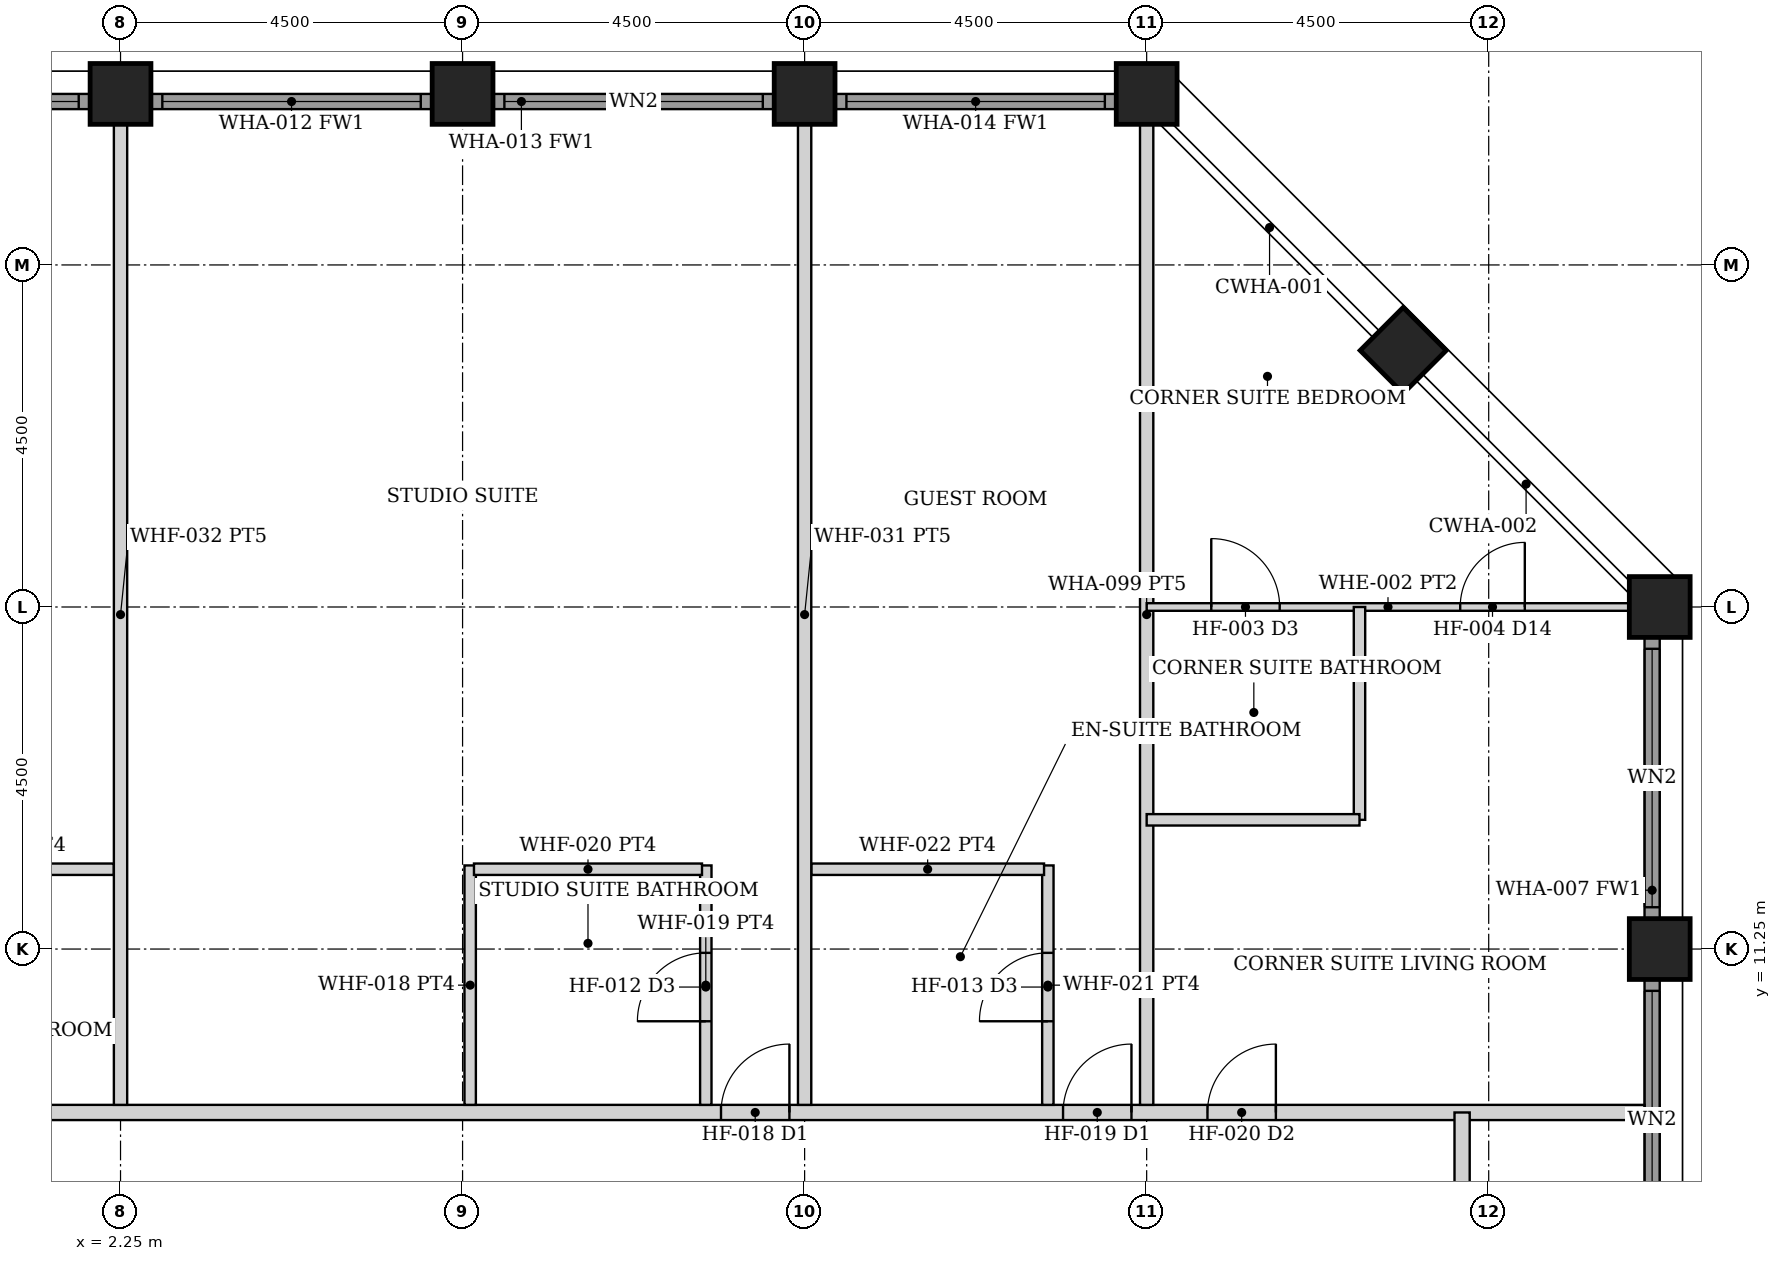
"""IFC4 building model, lengths in metres.
Left out: names, types, materials, properties, quantities, classifications, styles, units other than length and angle.
Written with IfcOpenShell. Run it as: python <this file> out.ifc"""

import sys

from ifc_helpers import new_model, si_unit, direction, frame, frame_2d, origin, origin_2d, place, context, subcontext, project, spatial, rectangle, hollow_rectangle, extrude, element, fill, save


model = new_model("IFC4")
c1 = context("Model", 3, precision=1e-05, world=origin(), true_north=direction((0.0, 1.0)))
c2 = subcontext(c1, "Body", "Model", "MODEL_VIEW")
j1 = project(units=[si_unit("LENGTHUNIT", "METRE"), si_unit("PLANEANGLEUNIT", "RADIAN")], contexts=[c1])
p1 = place(None, origin())
s1 = spatial("IfcSite", under=j1, at=p1, CompositionType="ELEMENT")
p2 = place(p1, origin())
s2 = spatial("IfcBuilding", under=s1, at=p2, CompositionType="ELEMENT")
p3 = place(p2, frame((0.0, 0.0, 172.4)))
s3 = spatial("IfcBuildingStorey", under=s2, at=p3, CompositionType="ELEMENT", Elevation=172.4)
for number, where, z_axis, x_axis in (
    (1, (2.25, 22.5, 0.0), (0.0, 0.0, 1.0), (0.0, 1.0, 0.0)),
    (2, (6.75, 22.5, 0.0), (0.0, 0.0, 1.0), (0.0, 1.0, 0.0)),
    (3, (11.25, 22.5, 0.0), (0.0, 0.0, 1.0), (0.0, 1.0, 0.0)),
    (4, (22.5, 11.25, 0.0), (0.0, 0.0, 1.0), (1.0, 0.0, 0.0)),
    (5, (15.75, 22.5, 0.0), (0.0, 0.0, 1.0), (0.0, 1.0, 0.0)),
    (6, (22.5, 15.75, 0.0), (0.0, 0.0, 1.0), (1.0, 0.0, 0.0)),
    (7, (19.125, 19.125, 0.0), (0.0, 0.0, 1.0), (0.707, 0.707, 0.0)),
):
    element("IfcColumn", number, at=place(p3, frame(where, z_axis=z_axis, x_axis=x_axis)), inside=s3, PredefinedType="COLUMN", context=c2, shape_type="SweptSolid", body=[
        extrude(hollow_rectangle(XDim=0.8, YDim=0.8, WallThickness=0.045, at=origin_2d()), origin(), (0.0, 0.0, 1.0), 3.6),
    ])
p4 = place(p3, frame((22.4, 7.155, 0.0), z_axis=(0.0, 0.0, 1.0), x_axis=(0.0, 1.0, 0.0)))
e8 = element("IfcWall", 8, at=p4, inside=s3, PredefinedType="SOLIDWALL", context=c2, shape_type="SweptSolid", body=[
    extrude(rectangle(XDim=3.69, YDim=0.2, at=frame_2d((1.845, 0.0))), origin(), (0.0, 0.0, 1.0), 2.479),
])
p5 = place(p4, frame((0.145, 0.0, 0.3)))
e9 = element("IfcOpeningElement", 9, at=p5, cuts=e8, PredefinedType="OPENING", context=c2, shape_type="SweptSolid", body=[
    extrude(rectangle(XDim=3.4, YDim=2.029, at=frame_2d((1.7, 1.015))), frame((0.0, 0.11, 0.0), z_axis=(0.0, -1.0, 0.0), x_axis=(1.0, 0.0, 0.0)), (0.0, 0.0, 1.0), 0.22),
])
p6 = place(p3, frame((22.4, 11.655, 0.0), z_axis=(0.0, 0.0, 1.0), x_axis=(0.0, 1.0, 0.0)))
e10 = element("IfcWall", 10, at=p6, inside=s3, PredefinedType="SOLIDWALL", context=c2, shape_type="SweptSolid", body=[
    extrude(rectangle(XDim=3.69, YDim=0.2, at=frame_2d((1.845, 0.0))), origin(), (0.0, 0.0, 1.0), 2.479),
])
p7 = place(p6, frame((0.145, 0.0, 0.3)))
e11 = element("IfcOpeningElement", 11, at=p7, cuts=e10, PredefinedType="OPENING", context=c2, shape_type="SweptSolid", body=[
    extrude(rectangle(XDim=3.4, YDim=2.029, at=frame_2d((1.7, 1.015))), frame((0.0, 0.11, 0.0), z_axis=(0.0, -1.0, 0.0), x_axis=(1.0, 0.0, 0.0)), (0.0, 0.0, 1.0), 0.22),
])
p8 = place(p3, frame((-1.845, 22.4, 0.0), z_axis=(0.0, 0.0, 1.0), x_axis=(1.0, 0.0, 0.0)))
e12 = element("IfcWall", 12, at=p8, inside=s3, PredefinedType="SOLIDWALL", context=c2, shape_type="SweptSolid", body=[
    extrude(rectangle(XDim=3.69, YDim=0.2, at=frame_2d((1.845, 0.0))), origin(), (0.0, 0.0, 1.0), 2.479),
])
p9 = place(p8, frame((0.145, 0.0, 0.3)))
e13 = element("IfcOpeningElement", 13, at=p9, cuts=e12, PredefinedType="OPENING", context=c2, shape_type="SweptSolid", body=[
    extrude(rectangle(XDim=3.4, YDim=2.029, at=frame_2d((1.7, 1.015))), frame((0.0, 0.11, 0.0), z_axis=(0.0, -1.0, 0.0), x_axis=(1.0, 0.0, 0.0)), (0.0, 0.0, 1.0), 0.22),
])
p10 = place(p3, frame((2.655, 22.4, 0.0), z_axis=(0.0, 0.0, 1.0), x_axis=(1.0, 0.0, 0.0)))
e14 = element("IfcWall", 14, at=p10, inside=s3, PredefinedType="SOLIDWALL", context=c2, shape_type="SweptSolid", body=[
    extrude(rectangle(XDim=3.69, YDim=0.2, at=frame_2d((1.845, 0.0))), origin(), (0.0, 0.0, 1.0), 2.479),
])
p11 = place(p10, frame((0.145, 0.0, 0.3)))
e15 = element("IfcOpeningElement", 15, at=p11, cuts=e14, PredefinedType="OPENING", context=c2, shape_type="SweptSolid", body=[
    extrude(rectangle(XDim=3.4, YDim=2.029, at=frame_2d((1.7, 1.015))), frame((0.0, 0.11, 0.0), z_axis=(0.0, -1.0, 0.0), x_axis=(1.0, 0.0, 0.0)), (0.0, 0.0, 1.0), 0.22),
])
p12 = place(p3, frame((7.155, 22.4, 0.0), z_axis=(0.0, 0.0, 1.0), x_axis=(1.0, 0.0, 0.0)))
e16 = element("IfcWall", 16, at=p12, inside=s3, PredefinedType="SOLIDWALL", context=c2, shape_type="SweptSolid", body=[
    extrude(rectangle(XDim=3.69, YDim=0.2, at=frame_2d((1.845, 0.0))), origin(), (0.0, 0.0, 1.0), 2.479),
])
p13 = place(p12, frame((0.145, 0.0, 0.3)))
e17 = element("IfcOpeningElement", 17, at=p13, cuts=e16, PredefinedType="OPENING", context=c2, shape_type="SweptSolid", body=[
    extrude(rectangle(XDim=3.4, YDim=2.029, at=frame_2d((1.7, 1.015))), frame((0.0, 0.11, 0.0), z_axis=(0.0, -1.0, 0.0), x_axis=(1.0, 0.0, 0.0)), (0.0, 0.0, 1.0), 0.22),
])
p14 = place(p3, frame((11.655, 22.4, 0.0), z_axis=(0.0, 0.0, 1.0), x_axis=(1.0, 0.0, 0.0)))
e18 = element("IfcWall", 18, at=p14, inside=s3, PredefinedType="SOLIDWALL", context=c2, shape_type="SweptSolid", body=[
    extrude(rectangle(XDim=3.69, YDim=0.2, at=frame_2d((1.845, 0.0))), origin(), (0.0, 0.0, 1.0), 2.479),
])
p15 = place(p14, frame((0.145, 0.0, 0.3)))
e19 = element("IfcOpeningElement", 19, at=p15, cuts=e18, PredefinedType="OPENING", context=c2, shape_type="SweptSolid", body=[
    extrude(rectangle(XDim=3.4, YDim=2.029, at=frame_2d((1.7, 1.015))), frame((0.0, 0.11, 0.0), z_axis=(0.0, -1.0, 0.0), x_axis=(1.0, 0.0, 0.0)), (0.0, 0.0, 1.0), 0.22),
])
p16 = place(p3, frame((-22.3, 9.1, 0.0), z_axis=(0.0, 0.0, 1.0), x_axis=(1.0, 0.0, 0.0)))
e20 = element("IfcWall", 20, at=p16, inside=s3, PredefinedType="PARTITIONING", context=c2, shape_type="SweptSolid", body=[
    extrude(rectangle(XDim=44.6, YDim=0.2, at=frame_2d((22.3, 0.0))), origin(), (0.0, 0.0, 1.0), 2.473),
])
p17 = place(p16, frame((11.35, 0.0, 0.0)))
e21 = element("IfcOpeningElement", 21, at=p17, cuts=e20, PredefinedType="OPENING", context=c2, shape_type="SweptSolid", body=[
    extrude(rectangle(XDim=0.9, YDim=2.1, at=frame_2d((0.45, 1.05))), frame((0.0, 0.11, 0.0), z_axis=(0.0, -1.0, 0.0), x_axis=(1.0, 0.0, 0.0)), (0.0, 0.0, 1.0), 0.22),
])
p18 = place(p16, frame((18.95, 0.0, 0.0)))
e22 = element("IfcOpeningElement", 22, at=p18, cuts=e20, PredefinedType="OPENING", context=c2, shape_type="SweptSolid", body=[
    extrude(rectangle(XDim=0.9, YDim=2.1, at=frame_2d((0.45, 1.05))), frame((0.0, 0.11, 0.0), z_axis=(0.0, -1.0, 0.0), x_axis=(1.0, 0.0, 0.0)), (0.0, 0.0, 1.0), 0.22),
])
p19 = place(p16, frame((20.25, 0.0, 0.0)))
e23 = element("IfcOpeningElement", 23, at=p19, cuts=e20, PredefinedType="OPENING", context=c2, shape_type="SweptSolid", body=[
    extrude(rectangle(XDim=0.9, YDim=2.1, at=frame_2d((0.45, 1.05))), frame((0.0, 0.11, 0.0), z_axis=(0.0, -1.0, 0.0), x_axis=(1.0, 0.0, 0.0)), (0.0, 0.0, 1.0), 0.22),
])
p20 = place(p16, frame((32.45, 0.0, 0.0)))
e24 = element("IfcOpeningElement", 24, at=p20, cuts=e20, PredefinedType="OPENING", context=c2, shape_type="SweptSolid", body=[
    extrude(rectangle(XDim=0.9, YDim=2.1, at=frame_2d((0.45, 1.05))), frame((0.0, 0.11, 0.0), z_axis=(0.0, -1.0, 0.0), x_axis=(1.0, 0.0, 0.0)), (0.0, 0.0, 1.0), 0.22),
])
p21 = place(p16, frame((36.95, 0.0, 0.0)))
e25 = element("IfcOpeningElement", 25, at=p21, cuts=e20, PredefinedType="OPENING", context=c2, shape_type="SweptSolid", body=[
    extrude(rectangle(XDim=0.9, YDim=2.1, at=frame_2d((0.45, 1.05))), frame((0.0, 0.11, 0.0), z_axis=(0.0, -1.0, 0.0), x_axis=(1.0, 0.0, 0.0)), (0.0, 0.0, 1.0), 0.22),
])
p22 = place(p16, frame((38.85, 0.0, 0.0)))
e26 = element("IfcOpeningElement", 26, at=p22, cuts=e20, PredefinedType="OPENING", context=c2, shape_type="SweptSolid", body=[
    extrude(rectangle(XDim=0.9, YDim=2.1, at=frame_2d((0.45, 1.05))), frame((0.0, 0.11, 0.0), z_axis=(0.0, -1.0, 0.0), x_axis=(1.0, 0.0, 0.0)), (0.0, 0.0, 1.0), 0.22),
])
p23 = place(p16, frame((4.85, 0.0, 0.0)))
e27 = element("IfcOpeningElement", 27, at=p23, cuts=e20, PredefinedType="OPENING", context=c2, shape_type="SweptSolid", body=[
    extrude(rectangle(XDim=0.9, YDim=2.1, at=frame_2d((0.45, 1.05))), frame((0.0, 0.11, 0.0), z_axis=(0.0, -1.0, 0.0), x_axis=(1.0, 0.0, 0.0)), (0.0, 0.0, 1.0), 0.22),
])
p24 = place(p3, frame((19.9, -9.1, 0.0), z_axis=(0.0, 0.0, 1.0), x_axis=(0.0, 1.0, 0.0)))
e28 = element("IfcWall", 28, at=p24, inside=s3, PredefinedType="PARTITIONING", context=c2, shape_type="SweptSolid", body=[
    extrude(rectangle(XDim=18.2, YDim=0.2, at=frame_2d((9.1, 0.0))), origin(), (0.0, 0.0, 1.0), 2.473),
])
p25 = place(p24, frame((8.425, 0.0, 0.0)))
e29 = element("IfcOpeningElement", 29, at=p25, cuts=e28, PredefinedType="OPENING", context=c2, shape_type="SweptSolid", body=[
    extrude(rectangle(XDim=1.35, YDim=2.1, at=frame_2d((0.675, 1.05))), frame((0.0, 0.11, 0.0), z_axis=(0.0, -1.0, 0.0), x_axis=(1.0, 0.0, 0.0)), (0.0, 0.0, 1.0), 0.22),
])
p26 = place(p3, frame((-0.9, 12.3, 0.0), z_axis=(0.0, 0.0, 1.0), x_axis=(1.0, 0.0, 0.0)))
e30 = element("IfcWall", 30, at=p26, inside=s3, PredefinedType="PARTITIONING", context=c2, shape_type="SweptSolid", body=[
    extrude(rectangle(XDim=3.062, YDim=0.15, at=frame_2d((1.531, 0.0))), origin(), (0.0, 0.0, 1.0), 2.473),
])
p27 = place(p3, frame((9.95, 9.2, 0.0), z_axis=(0.0, 0.0, 1.0), x_axis=(0.0, 1.0, 0.0)))
e31 = element("IfcWall", 31, at=p27, inside=s3, PredefinedType="PARTITIONING", context=c2, shape_type="SweptSolid", body=[
    extrude(rectangle(XDim=3.15, YDim=0.15, at=frame_2d((1.575, 0.0))), origin(), (0.0, 0.0, 1.0), 2.473),
])
p28 = place(p27, frame((1.1, 0.0, 0.0)))
e32 = element("IfcOpeningElement", 32, at=p28, cuts=e31, PredefinedType="OPENING", context=c2, shape_type="SweptSolid", body=[
    extrude(rectangle(XDim=0.9, YDim=2.1, at=frame_2d((0.45, 1.05))), frame((0.0, 0.085, 0.0), z_axis=(0.0, -1.0, 0.0), x_axis=(1.0, 0.0, 0.0)), (0.0, 0.0, 1.0), 0.17),
])
p29 = place(p3, frame((6.85, 9.2, 0.0), z_axis=(0.0, 0.0, 1.0), x_axis=(0.0, 1.0, 0.0)))
e33 = element("IfcWall", 33, at=p29, inside=s3, PredefinedType="PARTITIONING", context=c2, shape_type="SweptSolid", body=[
    extrude(rectangle(XDim=3.15, YDim=0.15, at=frame_2d((1.575, 0.0))), origin(), (0.0, 0.0, 1.0), 2.473),
])
p30 = place(p3, frame((6.9, 12.3, 0.0), z_axis=(0.0, 0.0, 1.0), x_axis=(1.0, 0.0, 0.0)))
e34 = element("IfcWall", 34, at=p30, inside=s3, PredefinedType="PARTITIONING", context=c2, shape_type="SweptSolid", body=[
    extrude(rectangle(XDim=3.0, YDim=0.15, at=frame_2d((1.5, 0.0))), origin(), (0.0, 0.0, 1.0), 2.473),
])
p31 = place(p3, frame((14.45, 9.2, 0.0), z_axis=(0.0, 0.0, 1.0), x_axis=(0.0, 1.0, 0.0)))
e35 = element("IfcWall", 35, at=p31, inside=s3, PredefinedType="PARTITIONING", context=c2, shape_type="SweptSolid", body=[
    extrude(rectangle(XDim=3.15, YDim=0.15, at=frame_2d((1.575, 0.0))), origin(), (0.0, 0.0, 1.0), 2.473),
])
p32 = place(p31, frame((1.1, 0.0, 0.0)))
e36 = element("IfcOpeningElement", 36, at=p32, cuts=e35, PredefinedType="OPENING", context=c2, shape_type="SweptSolid", body=[
    extrude(rectangle(XDim=0.9, YDim=2.1, at=frame_2d((0.45, 1.05))), frame((0.0, 0.085, 0.0), z_axis=(0.0, -1.0, 0.0), x_axis=(1.0, 0.0, 0.0)), (0.0, 0.0, 1.0), 0.17),
])
p33 = place(p3, frame((11.337, 12.3, 0.0), z_axis=(0.0, 0.0, 1.0), x_axis=(1.0, 0.0, 0.0)))
e37 = element("IfcWall", 37, at=p33, inside=s3, PredefinedType="PARTITIONING", context=c2, shape_type="SweptSolid", body=[
    extrude(rectangle(XDim=3.062, YDim=0.15, at=frame_2d((1.531, 0.0))), origin(), (0.0, 0.0, 1.0), 2.473),
])
for number, where, z_axis, x_axis in (
    (38, (2.25, 9.2, 0.0), (0.0, 0.0, 1.0), (0.0, 1.0, 0.0)),
    (39, (11.25, 9.2, 0.0), (0.0, 0.0, 1.0), (0.0, 1.0, 0.0)),
    (40, (15.75, 9.2, 0.0), (0.0, 0.0, 1.0), (0.0, 1.0, 0.0)),
):
    element("IfcWall", number, at=place(p3, frame(where, z_axis=z_axis, x_axis=x_axis)), inside=s3, PredefinedType="PARTITIONING", context=c2, shape_type="SweptSolid", body=[
        extrude(rectangle(XDim=12.9, YDim=0.175, at=frame_2d((6.45, 0.0))), origin(), (0.0, 0.0, 1.0), 2.473),
    ])
p34 = place(p3, frame((15.75, 15.75, 0.0), z_axis=(0.0, 0.0, 1.0), x_axis=(1.0, 0.0, 0.0)))
e41 = element("IfcWall", 41, at=p34, inside=s3, PredefinedType="PARTITIONING", context=c2, shape_type="SweptSolid", body=[
    extrude(rectangle(XDim=6.35, YDim=0.1, at=frame_2d((3.175, 0.0))), origin(), (0.0, 0.0, 1.0), 2.473),
])
p35 = place(p34, frame((4.125, 0.0, 0.0)))
e42 = element("IfcOpeningElement", 42, at=p35, cuts=e41, PredefinedType="OPENING", context=c2, shape_type="SweptSolid", body=[
    extrude(rectangle(XDim=0.85, YDim=2.1, at=frame_2d((0.425, 1.05))), frame((0.0, 0.06, 0.0), z_axis=(0.0, -1.0, 0.0), x_axis=(1.0, 0.0, 0.0)), (0.0, 0.0, 1.0), 0.12),
])
p36 = place(p34, frame((0.85, 0.0, 0.0)))
e43 = element("IfcOpeningElement", 43, at=p36, cuts=e41, PredefinedType="OPENING", context=c2, shape_type="SweptSolid", body=[
    extrude(rectangle(XDim=0.9, YDim=2.1, at=frame_2d((0.45, 1.05))), frame((0.0, 0.06, 0.0), z_axis=(0.0, -1.0, 0.0), x_axis=(1.0, 0.0, 0.0)), (0.0, 0.0, 1.0), 0.12),
])
for number, where, z_axis, x_axis in (
    (44, (18.55, 12.95, 0.0), (0.0, 0.0, 1.0), (0.0, 1.0, 0.0)),
    (45, (15.75, 12.95, 0.0), (0.0, 0.0, 1.0), (1.0, 0.0, 0.0)),
):
    element("IfcWall", number, at=place(p3, frame(where, z_axis=z_axis, x_axis=x_axis)), inside=s3, PredefinedType="PARTITIONING", context=c2, shape_type="SweptSolid", body=[
        extrude(rectangle(XDim=2.8, YDim=0.15, at=frame_2d((1.4, 0.0))), origin(), (0.0, 0.0, 1.0), 2.473),
    ])
p37 = place(p5, origin())
e46 = element("IfcWindow", 46, at=p37, inside=s3, PartitioningType="SINGLE_PANEL", PredefinedType="WINDOW", context=c2, shape_type="SweptSolid", body=[
    extrude(rectangle(XDim=3.4, YDim=2.029, at=frame_2d((1.7, 1.015))), frame((0.0, 0.03, 0.0), z_axis=(0.0, -1.0, 0.0), x_axis=(1.0, 0.0, 0.0)), (0.0, 0.0, 1.0), 0.06),
])
fill(e9, e46)
p38 = place(p7, origin())
e47 = element("IfcWindow", 47, at=p38, inside=s3, PartitioningType="SINGLE_PANEL", PredefinedType="WINDOW", context=c2, shape_type="SweptSolid", body=[
    extrude(rectangle(XDim=3.4, YDim=2.029, at=frame_2d((1.7, 1.015))), frame((0.0, 0.03, 0.0), z_axis=(0.0, -1.0, 0.0), x_axis=(1.0, 0.0, 0.0)), (0.0, 0.0, 1.0), 0.06),
])
fill(e11, e47)
p39 = place(p9, origin())
e48 = element("IfcWindow", 48, at=p39, inside=s3, PartitioningType="SINGLE_PANEL", PredefinedType="WINDOW", context=c2, shape_type="SweptSolid", body=[
    extrude(rectangle(XDim=3.4, YDim=2.029, at=frame_2d((1.7, 1.015))), frame((0.0, 0.03, 0.0), z_axis=(0.0, -1.0, 0.0), x_axis=(1.0, 0.0, 0.0)), (0.0, 0.0, 1.0), 0.06),
])
fill(e13, e48)
p40 = place(p11, origin())
e49 = element("IfcWindow", 49, at=p40, inside=s3, PartitioningType="SINGLE_PANEL", PredefinedType="WINDOW", context=c2, shape_type="SweptSolid", body=[
    extrude(rectangle(XDim=3.4, YDim=2.029, at=frame_2d((1.7, 1.015))), frame((0.0, 0.03, 0.0), z_axis=(0.0, -1.0, 0.0), x_axis=(1.0, 0.0, 0.0)), (0.0, 0.0, 1.0), 0.06),
])
fill(e15, e49)
p41 = place(p13, origin())
e50 = element("IfcWindow", 50, at=p41, inside=s3, PartitioningType="SINGLE_PANEL", PredefinedType="WINDOW", context=c2, shape_type="SweptSolid", body=[
    extrude(rectangle(XDim=3.4, YDim=2.029, at=frame_2d((1.7, 1.015))), frame((0.0, 0.03, 0.0), z_axis=(0.0, -1.0, 0.0), x_axis=(1.0, 0.0, 0.0)), (0.0, 0.0, 1.0), 0.06),
])
fill(e17, e50)
p42 = place(p15, origin())
e51 = element("IfcWindow", 51, at=p42, inside=s3, PartitioningType="SINGLE_PANEL", PredefinedType="WINDOW", context=c2, shape_type="SweptSolid", body=[
    extrude(rectangle(XDim=3.4, YDim=2.029, at=frame_2d((1.7, 1.015))), frame((0.0, 0.03, 0.0), z_axis=(0.0, -1.0, 0.0), x_axis=(1.0, 0.0, 0.0)), (0.0, 0.0, 1.0), 0.06),
])
fill(e19, e51)
p43 = place(p20, origin())
e52 = element("IfcDoor", 52, at=p43, inside=s3, OperationType="SINGLE_SWING_RIGHT", PredefinedType="DOOR", context=c2, shape_type="SweptSolid", body=[
    extrude(rectangle(XDim=0.9, YDim=2.1, at=frame_2d((0.45, 1.05))), frame((0.0, 0.025, 0.0), z_axis=(0.0, -1.0, 0.0), x_axis=(1.0, 0.0, 0.0)), (0.0, 0.0, 1.0), 0.05),
])
fill(e24, e52)
p44 = place(p28, origin())
e53 = element("IfcDoor", 53, at=p44, inside=s3, OperationType="SINGLE_SWING_LEFT", PredefinedType="DOOR", context=c2, shape_type="SweptSolid", body=[
    extrude(rectangle(XDim=0.9, YDim=2.1, at=frame_2d((0.45, 1.05))), frame((0.0, 0.025, 0.0), z_axis=(0.0, -1.0, 0.0), x_axis=(1.0, 0.0, 0.0)), (0.0, 0.0, 1.0), 0.05),
])
fill(e32, e53)
p45 = place(p21, origin())
e54 = element("IfcDoor", 54, at=p45, inside=s3, OperationType="SINGLE_SWING_RIGHT", PredefinedType="DOOR", context=c2, shape_type="SweptSolid", body=[
    extrude(rectangle(XDim=0.9, YDim=2.1, at=frame_2d((0.45, 1.05))), frame((0.0, 0.025, 0.0), z_axis=(0.0, -1.0, 0.0), x_axis=(1.0, 0.0, 0.0)), (0.0, 0.0, 1.0), 0.05),
])
fill(e25, e54)
p46 = place(p32, origin())
e55 = element("IfcDoor", 55, at=p46, inside=s3, OperationType="SINGLE_SWING_LEFT", PredefinedType="DOOR", context=c2, shape_type="SweptSolid", body=[
    extrude(rectangle(XDim=0.9, YDim=2.1, at=frame_2d((0.45, 1.05))), frame((0.0, 0.025, 0.0), z_axis=(0.0, -1.0, 0.0), x_axis=(1.0, 0.0, 0.0)), (0.0, 0.0, 1.0), 0.05),
])
fill(e36, e55)
p47 = place(p22, origin())
e56 = element("IfcDoor", 56, at=p47, inside=s3, OperationType="SINGLE_SWING_RIGHT", PredefinedType="DOOR", context=c2, shape_type="SweptSolid", body=[
    extrude(rectangle(XDim=0.9, YDim=2.1, at=frame_2d((0.45, 1.05))), frame((0.0, 0.025, 0.0), z_axis=(0.0, -1.0, 0.0), x_axis=(1.0, 0.0, 0.0)), (0.0, 0.0, 1.0), 0.05),
])
fill(e26, e56)
p48 = place(p35, origin())
e57 = element("IfcDoor", 57, at=p48, inside=s3, OperationType="SINGLE_SWING_RIGHT", PredefinedType="DOOR", context=c2, shape_type="SweptSolid", body=[
    extrude(rectangle(XDim=0.85, YDim=2.1, at=frame_2d((0.425, 1.05))), frame((0.0, 0.025, 0.0), z_axis=(0.0, -1.0, 0.0), x_axis=(1.0, 0.0, 0.0)), (0.0, 0.0, 1.0), 0.05),
])
fill(e42, e57)
p49 = place(p36, origin())
e58 = element("IfcDoor", 58, at=p49, inside=s3, OperationType="SINGLE_SWING_LEFT", PredefinedType="DOOR", context=c2, shape_type="SweptSolid", body=[
    extrude(rectangle(XDim=0.9, YDim=2.1, at=frame_2d((0.45, 1.05))), frame((0.0, 0.025, 0.0), z_axis=(0.0, -1.0, 0.0), x_axis=(1.0, 0.0, 0.0)), (0.0, 0.0, 1.0), 0.05),
])
fill(e43, e58)
save(model, sys.argv[1])
